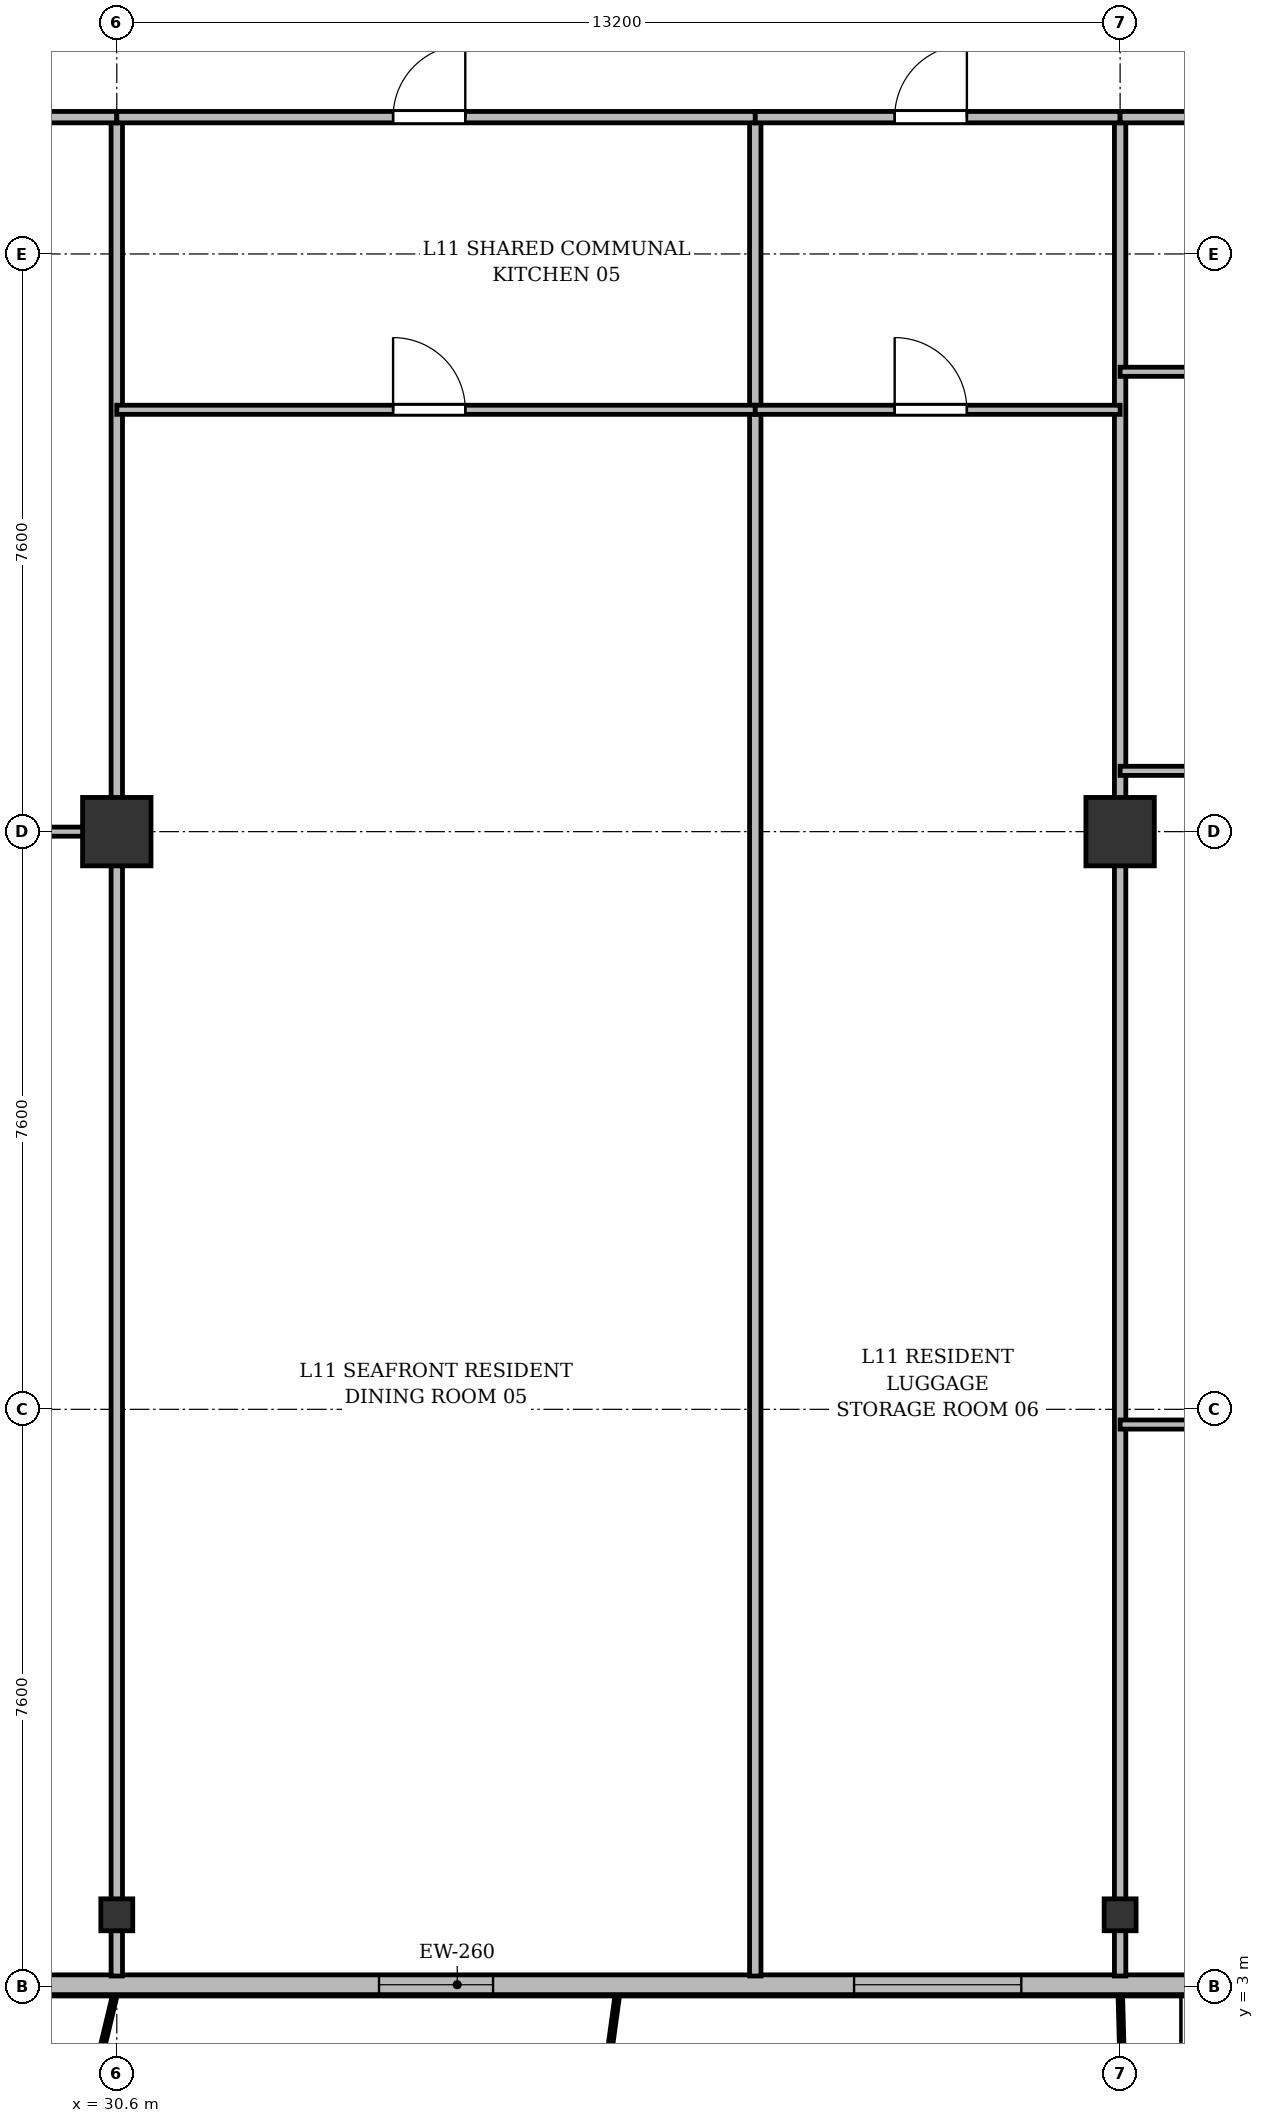
"""IFC4 building model, lengths in metres.
Left out: names, types, materials, properties, quantities, classifications, styles, units other than length and angle.
Written with IfcOpenShell. Run it as: python <this file> out.ifc"""

import sys

from ifc_helpers import new_model, si_unit, direction, frame, frame_2d, origin, origin_2d, place, context, subcontext, project, spatial, rectangle, i_section, extrude, source, transform, mapped, element, fill, save


model = new_model("IFC4")
c1 = context("Model", 3, precision=1e-05, world=origin(), true_north=direction((0.0, 1.0)))
c2 = subcontext(c1, "Body", "Model", "MODEL_VIEW")
j1 = project(units=[si_unit("LENGTHUNIT", "METRE"), si_unit("PLANEANGLEUNIT", "RADIAN")], contexts=[c1])
p1 = place(None, origin())
s1 = spatial("IfcSite", under=j1, at=p1, CompositionType="ELEMENT")
p2 = place(p1, origin())
s2 = spatial("IfcBuilding", under=s1, at=p2, CompositionType="ELEMENT")
p3 = place(p2, frame((0.0, 0.0, 45.1)))
s3 = spatial("IfcBuildingStorey", under=s2, at=p3, CompositionType="ELEMENT", Elevation=45.1)
m1 = source(origin(), c2, "Body", "SweptSolid", [
    extrude(i_section(OverallWidth=0.42, OverallDepth=0.42, WebThickness=0.026, FlangeThickness=0.04, at=origin_2d()), origin(), (0.0, 0.0, 1.0), 3.6),
])
p4 = place(p3, frame((30.6, 3.95, 0.0), z_axis=(0.0, 0.0, 1.0), x_axis=(1.0, 0.0, 0.0)))
e1 = element("IfcColumn", 1, at=p4, inside=s3, PredefinedType="COLUMN", context=c2, shape_type="MappedRepresentation", body=[
    mapped(m1, transform((0.0, 0.0, 0.0), x_axis=(1.0, 0.0, 0.0), y_axis=(0.0, 1.0, 0.0), z_axis=(0.0, 0.0, 1.0), scale=1.0)),
])
m2 = source(origin(), c2, "Body", "SweptSolid", [
    extrude(rectangle(XDim=0.9, YDim=0.9, at=origin_2d()), origin(), (0.0, 0.0, 1.0), 3.6),
])
p5 = place(p3, frame((30.6, 18.2, 0.0), z_axis=(0.0, 0.0, 1.0), x_axis=(1.0, 0.0, 0.0)))
e2 = element("IfcColumn", 2, at=p5, inside=s3, PredefinedType="COLUMN", context=c2, shape_type="MappedRepresentation", body=[
    mapped(m2, transform((0.0, 0.0, 0.0), x_axis=(1.0, 0.0, 0.0), y_axis=(0.0, 1.0, 0.0), z_axis=(0.0, 0.0, 1.0), scale=1.0)),
])
p6 = place(p3, frame((43.8, 3.95, 0.0), z_axis=(0.0, 0.0, 1.0), x_axis=(1.0, 0.0, 0.0)))
e3 = element("IfcColumn", 3, at=p6, inside=s3, PredefinedType="COLUMN", context=c2, shape_type="MappedRepresentation", body=[
    mapped(m1, transform((0.0, 0.0, 0.0), x_axis=(1.0, 0.0, 0.0), y_axis=(0.0, 1.0, 0.0), z_axis=(0.0, 0.0, 1.0), scale=1.0)),
])
p7 = place(p3, frame((43.8, 18.2, 0.0), z_axis=(0.0, 0.0, 1.0), x_axis=(1.0, 0.0, 0.0)))
e4 = element("IfcColumn", 4, at=p7, inside=s3, PredefinedType="COLUMN", context=c2, shape_type="MappedRepresentation", body=[
    mapped(m2, transform((0.0, 0.0, 0.0), x_axis=(1.0, 0.0, 0.0), y_axis=(0.0, 1.0, 0.0), z_axis=(0.0, 0.0, 1.0), scale=1.0)),
])
p8 = place(p3, frame((66.9, 3.03, 0.0), z_axis=(0.0, 0.0, 1.0), x_axis=(-1.0, 0.0, 0.0)))
e5 = element("IfcWall", 5, at=p8, inside=s3, PredefinedType="SOLIDWALL", context=c2, shape_type="SweptSolid", body=[
    extrude(rectangle(XDim=59.4, YDim=0.26, at=frame_2d((29.7, 0.0))), origin(), (0.0, 0.0, 1.0), 3.34),
])
p9 = place(p8, frame((0.395, 0.0, 0.9)))
e6 = element("IfcOpeningElement", 6, at=p9, cuts=e5, PredefinedType="OPENING", context=c2, shape_type="SweptSolid", body=[
    extrude(rectangle(XDim=2.2, YDim=1.8, at=frame_2d((1.1, 0.9))), frame((0.0, 0.14, 0.0), z_axis=(0.0, -1.0, 0.0), x_axis=(1.0, 0.0, 0.0)), (0.0, 0.0, 1.0), 0.28),
])
p10 = place(p8, frame((4.75, 0.0, 0.9)))
e7 = element("IfcOpeningElement", 7, at=p10, cuts=e5, PredefinedType="OPENING", context=c2, shape_type="SweptSolid", body=[
    extrude(rectangle(XDim=1.5, YDim=1.75, at=frame_2d((0.75, 0.875))), frame((0.0, 0.14, 0.0), z_axis=(0.0, -1.0, 0.0), x_axis=(1.0, 0.0, 0.0)), (0.0, 0.0, 1.0), 0.28),
])
p11 = place(p8, frame((11.0, 0.0, 0.9)))
e8 = element("IfcOpeningElement", 8, at=p11, cuts=e5, PredefinedType="OPENING", context=c2, shape_type="SweptSolid", body=[
    extrude(rectangle(XDim=2.0, YDim=1.95, at=frame_2d((1.0, 0.975))), frame((0.0, 0.14, 0.0), z_axis=(0.0, -1.0, 0.0), x_axis=(1.0, 0.0, 0.0)), (0.0, 0.0, 1.0), 0.28),
])
p12 = place(p8, frame((17.007, 0.0, 0.0)))
e9 = element("IfcOpeningElement", 9, at=p12, cuts=e5, PredefinedType="OPENING", context=c2, shape_type="SweptSolid", body=[
    extrude(rectangle(XDim=1.2, YDim=2.2, at=frame_2d((0.6, 1.1))), frame((0.0, 0.14, 0.0), z_axis=(0.0, -1.0, 0.0), x_axis=(1.0, 0.0, 0.0)), (0.0, 0.0, 1.0), 0.28),
])
p13 = place(p8, frame((20.4, 0.0, 0.9)))
e10 = element("IfcOpeningElement", 10, at=p13, cuts=e5, PredefinedType="OPENING", context=c2, shape_type="SweptSolid", body=[
    extrude(rectangle(XDim=1.8, YDim=1.8, at=frame_2d((0.9, 0.9))), frame((0.0, 0.14, 0.0), z_axis=(0.0, -1.0, 0.0), x_axis=(1.0, 0.0, 0.0)), (0.0, 0.0, 1.0), 0.28),
])
p14 = place(p8, frame((24.4, 0.0, 0.9)))
e11 = element("IfcOpeningElement", 11, at=p14, cuts=e5, PredefinedType="OPENING", context=c2, shape_type="SweptSolid", body=[
    extrude(rectangle(XDim=2.2, YDim=1.8, at=frame_2d((1.1, 0.9))), frame((0.0, 0.14, 0.0), z_axis=(0.0, -1.0, 0.0), x_axis=(1.0, 0.0, 0.0)), (0.0, 0.0, 1.0), 0.28),
])
p15 = place(p8, frame((31.35, 0.0, 0.9)))
e12 = element("IfcOpeningElement", 12, at=p15, cuts=e5, PredefinedType="OPENING", context=c2, shape_type="SweptSolid", body=[
    extrude(rectangle(XDim=1.5, YDim=1.75, at=frame_2d((0.75, 0.875))), frame((0.0, 0.14, 0.0), z_axis=(0.0, -1.0, 0.0), x_axis=(1.0, 0.0, 0.0)), (0.0, 0.0, 1.0), 0.28),
])
p16 = place(p8, frame((38.9, 0.0, 0.9)))
e13 = element("IfcOpeningElement", 13, at=p16, cuts=e5, PredefinedType="OPENING", context=c2, shape_type="SweptSolid", body=[
    extrude(rectangle(XDim=2.0, YDim=1.95, at=frame_2d((1.0, 0.975))), frame((0.0, 0.14, 0.0), z_axis=(0.0, -1.0, 0.0), x_axis=(1.0, 0.0, 0.0)), (0.0, 0.0, 1.0), 0.28),
])
p17 = place(p8, frame((45.435, 0.0, 0.0)))
e14 = element("IfcOpeningElement", 14, at=p17, cuts=e5, PredefinedType="OPENING", context=c2, shape_type="SweptSolid", body=[
    extrude(rectangle(XDim=1.2, YDim=2.2, at=frame_2d((0.6, 1.1))), frame((0.0, 0.14, 0.0), z_axis=(0.0, -1.0, 0.0), x_axis=(1.0, 0.0, 0.0)), (0.0, 0.0, 1.0), 0.28),
])
p18 = place(p8, frame((48.45, 0.0, 0.9)))
e15 = element("IfcOpeningElement", 15, at=p18, cuts=e5, PredefinedType="OPENING", context=c2, shape_type="SweptSolid", body=[
    extrude(rectangle(XDim=1.8, YDim=1.8, at=frame_2d((0.9, 0.9))), frame((0.0, 0.14, 0.0), z_axis=(0.0, -1.0, 0.0), x_axis=(1.0, 0.0, 0.0)), (0.0, 0.0, 1.0), 0.28),
])
p19 = place(p8, frame((52.0, 0.0, 0.9)))
e16 = element("IfcOpeningElement", 16, at=p19, cuts=e5, PredefinedType="OPENING", context=c2, shape_type="SweptSolid", body=[
    extrude(rectangle(XDim=2.2, YDim=1.8, at=frame_2d((1.1, 0.9))), frame((0.0, 0.14, 0.0), z_axis=(0.0, -1.0, 0.0), x_axis=(1.0, 0.0, 0.0)), (0.0, 0.0, 1.0), 0.28),
])
p20 = place(p8, frame((56.355, 0.0, 0.9)))
e17 = element("IfcOpeningElement", 17, at=p20, cuts=e5, PredefinedType="OPENING", context=c2, shape_type="SweptSolid", body=[
    extrude(rectangle(XDim=1.5, YDim=1.75, at=frame_2d((0.75, 0.875))), frame((0.0, 0.14, 0.0), z_axis=(0.0, -1.0, 0.0), x_axis=(1.0, 0.0, 0.0)), (0.0, 0.0, 1.0), 0.28),
])
p21 = place(p3, frame((30.6, 3.145, 0.0), z_axis=(0.0, 0.0, 1.0), x_axis=(0.0, 1.0, 0.0)))
e18 = element("IfcWall", 18, at=p21, inside=s3, PredefinedType="PARTITIONING", context=c2, shape_type="SweptSolid", body=[
    extrude(rectangle(XDim=24.455, YDim=0.15, at=frame_2d((12.228, 0.0))), origin(), (0.0, 0.0, 1.0), 2.752),
])
p22 = place(p3, frame((39.0, 3.145, 0.0), z_axis=(0.0, 0.0, 1.0), x_axis=(0.0, 1.0, 0.0)))
e19 = element("IfcWall", 19, at=p22, inside=s3, PredefinedType="PARTITIONING", context=c2, shape_type="SweptSolid", body=[
    extrude(rectangle(XDim=24.455, YDim=0.15, at=frame_2d((12.228, 0.0))), origin(), (0.0, 0.0, 1.0), 2.69),
])
p23 = place(p3, frame((43.8, 3.145, 0.0), z_axis=(0.0, 0.0, 1.0), x_axis=(0.0, 1.0, 0.0)))
e20 = element("IfcWall", 20, at=p23, inside=s3, PredefinedType="PARTITIONING", context=c2, shape_type="SweptSolid", body=[
    extrude(rectangle(XDim=24.455, YDim=0.15, at=frame_2d((12.228, 0.0))), origin(), (0.0, 0.0, 1.0), 2.752),
])
p24 = place(p3, frame((23.4, 27.6, 0.0), z_axis=(0.0, 0.0, 1.0), x_axis=(1.0, 0.0, 0.0)))
e21 = element("IfcWall", 21, at=p24, inside=s3, PredefinedType="PARTITIONING", context=c2, shape_type="SweptSolid", body=[
    extrude(rectangle(XDim=7.2, YDim=0.15, at=frame_2d((3.6, 0.0))), origin(), (0.0, 0.0, 1.0), 2.752),
])
p25 = place(p24, frame((3.125, 0.0, 0.0)))
e22 = element("IfcOpeningElement", 22, at=p25, cuts=e21, PredefinedType="OPENING", context=c2, shape_type="SweptSolid", body=[
    extrude(rectangle(XDim=0.95, YDim=2.15, at=frame_2d((0.475, 1.075))), frame((0.0, 0.085, 0.0), z_axis=(0.0, -1.0, 0.0), x_axis=(1.0, 0.0, 0.0)), (0.0, 0.0, 1.0), 0.17),
])
p26 = place(p3, frame((23.4, 18.2, 0.0), z_axis=(0.0, 0.0, 1.0), x_axis=(1.0, 0.0, 0.0)))
e23 = element("IfcWall", 23, at=p26, inside=s3, PredefinedType="PARTITIONING", context=c2, shape_type="SweptSolid", body=[
    extrude(rectangle(XDim=7.2, YDim=0.12, at=frame_2d((3.6, 0.0))), origin(), (0.0, 0.0, 1.0), 2.69),
])
p27 = place(p26, frame((3.125, 0.0, 0.0)))
e24 = element("IfcOpeningElement", 24, at=p27, cuts=e23, PredefinedType="OPENING", context=c2, shape_type="SweptSolid", body=[
    extrude(rectangle(XDim=0.95, YDim=2.15, at=frame_2d((0.475, 1.075))), frame((0.0, 0.07, 0.0), z_axis=(0.0, -1.0, 0.0), x_axis=(1.0, 0.0, 0.0)), (0.0, 0.0, 1.0), 0.14),
])
p28 = place(p3, frame((30.6, 27.6, 0.0), z_axis=(0.0, 0.0, 1.0), x_axis=(1.0, 0.0, 0.0)))
e25 = element("IfcWall", 25, at=p28, inside=s3, PredefinedType="PARTITIONING", context=c2, shape_type="SweptSolid", body=[
    extrude(rectangle(XDim=8.4, YDim=0.15, at=frame_2d((4.2, 0.0))), origin(), (0.0, 0.0, 1.0), 2.752),
])
p29 = place(p28, frame((3.635, 0.0, 0.0)))
e26 = element("IfcOpeningElement", 26, at=p29, cuts=e25, PredefinedType="OPENING", context=c2, shape_type="SweptSolid", body=[
    extrude(rectangle(XDim=0.95, YDim=2.15, at=frame_2d((0.475, 1.075))), frame((0.0, 0.085, 0.0), z_axis=(0.0, -1.0, 0.0), x_axis=(1.0, 0.0, 0.0)), (0.0, 0.0, 1.0), 0.17),
])
p30 = place(p3, frame((30.6, 23.75, 0.0), z_axis=(0.0, 0.0, 1.0), x_axis=(1.0, 0.0, 0.0)))
e27 = element("IfcWall", 27, at=p30, inside=s3, PredefinedType="PARTITIONING", context=c2, shape_type="SweptSolid", body=[
    extrude(rectangle(XDim=8.4, YDim=0.12, at=frame_2d((4.2, 0.0))), origin(), (0.0, 0.0, 1.0), 2.752),
])
p31 = place(p30, frame((3.635, 0.0, 0.0)))
e28 = element("IfcOpeningElement", 28, at=p31, cuts=e27, PredefinedType="OPENING", context=c2, shape_type="SweptSolid", body=[
    extrude(rectangle(XDim=0.95, YDim=2.15, at=frame_2d((0.475, 1.075))), frame((0.0, 0.07, 0.0), z_axis=(0.0, -1.0, 0.0), x_axis=(1.0, 0.0, 0.0)), (0.0, 0.0, 1.0), 0.14),
])
p32 = place(p3, frame((39.0, 27.6, 0.0), z_axis=(0.0, 0.0, 1.0), x_axis=(1.0, 0.0, 0.0)))
e29 = element("IfcWall", 29, at=p32, inside=s3, PredefinedType="PARTITIONING", context=c2, shape_type="SweptSolid", body=[
    extrude(rectangle(XDim=4.8, YDim=0.15, at=frame_2d((2.4, 0.0))), origin(), (0.0, 0.0, 1.0), 2.752),
])
p33 = place(p32, frame((1.834, 0.0, 0.0)))
e30 = element("IfcOpeningElement", 30, at=p33, cuts=e29, PredefinedType="OPENING", context=c2, shape_type="SweptSolid", body=[
    extrude(rectangle(XDim=0.95, YDim=2.15, at=frame_2d((0.475, 1.075))), frame((0.0, 0.085, 0.0), z_axis=(0.0, -1.0, 0.0), x_axis=(1.0, 0.0, 0.0)), (0.0, 0.0, 1.0), 0.17),
])
p34 = place(p3, frame((39.0, 23.75, 0.0), z_axis=(0.0, 0.0, 1.0), x_axis=(1.0, 0.0, 0.0)))
e31 = element("IfcWall", 31, at=p34, inside=s3, PredefinedType="PARTITIONING", context=c2, shape_type="SweptSolid", body=[
    extrude(rectangle(XDim=4.8, YDim=0.12, at=frame_2d((2.4, 0.0))), origin(), (0.0, 0.0, 1.0), 2.752),
])
p35 = place(p34, frame((1.834, 0.0, 0.0)))
e32 = element("IfcOpeningElement", 32, at=p35, cuts=e31, PredefinedType="OPENING", context=c2, shape_type="SweptSolid", body=[
    extrude(rectangle(XDim=0.95, YDim=2.15, at=frame_2d((0.475, 1.075))), frame((0.0, 0.07, 0.0), z_axis=(0.0, -1.0, 0.0), x_axis=(1.0, 0.0, 0.0)), (0.0, 0.0, 1.0), 0.14),
])
p36 = place(p3, frame((43.8, 19.0, 0.0), z_axis=(0.0, 0.0, 1.0), x_axis=(1.0, 0.0, 0.0)))
e33 = element("IfcWall", 33, at=p36, inside=s3, PredefinedType="PARTITIONING", context=c2, shape_type="SweptSolid", body=[
    extrude(rectangle(XDim=7.2, YDim=0.12, at=frame_2d((3.6, 0.0))), origin(), (0.0, 0.0, 1.0), 2.752),
])
p37 = place(p36, frame((3.125, 0.0, 0.0)))
e34 = element("IfcOpeningElement", 34, at=p37, cuts=e33, PredefinedType="OPENING", context=c2, shape_type="SweptSolid", body=[
    extrude(rectangle(XDim=0.95, YDim=2.15, at=frame_2d((0.475, 1.075))), frame((0.0, 0.07, 0.0), z_axis=(0.0, -1.0, 0.0), x_axis=(1.0, 0.0, 0.0)), (0.0, 0.0, 1.0), 0.14),
])
p38 = place(p3, frame((43.8, 24.25, 0.0), z_axis=(0.0, 0.0, 1.0), x_axis=(1.0, 0.0, 0.0)))
e35 = element("IfcWall", 35, at=p38, inside=s3, PredefinedType="PARTITIONING", context=c2, shape_type="SweptSolid", body=[
    extrude(rectangle(XDim=2.4, YDim=0.12, at=frame_2d((1.2, 0.0))), origin(), (0.0, 0.0, 1.0), 2.752),
])
p39 = place(p3, frame((43.8, 27.6, 0.0), z_axis=(0.0, 0.0, 1.0), x_axis=(1.0, 0.0, 0.0)))
e36 = element("IfcWall", 36, at=p39, inside=s3, PredefinedType="PARTITIONING", context=c2, shape_type="SweptSolid", body=[
    extrude(rectangle(XDim=7.2, YDim=0.15, at=frame_2d((3.6, 0.0))), origin(), (0.0, 0.0, 1.0), 2.752),
])
p40 = place(p39, frame((4.706, 0.0, 0.0)))
e37 = element("IfcOpeningElement", 37, at=p40, cuts=e36, PredefinedType="OPENING", context=c2, shape_type="SweptSolid", body=[
    extrude(rectangle(XDim=0.95, YDim=2.15, at=frame_2d((0.475, 1.075))), frame((0.0, 0.085, 0.0), z_axis=(0.0, -1.0, 0.0), x_axis=(1.0, 0.0, 0.0)), (0.0, 0.0, 1.0), 0.17),
])
p41 = place(p3, frame((43.8, 10.4, 0.0), z_axis=(0.0, 0.0, 1.0), x_axis=(1.0, 0.0, 0.0)))
e38 = element("IfcWall", 38, at=p41, inside=s3, PredefinedType="PARTITIONING", context=c2, shape_type="SweptSolid", body=[
    extrude(rectangle(XDim=3.6, YDim=0.12, at=frame_2d((1.8, 0.0))), origin(), (0.0, 0.0, 1.0), 2.752),
])
p42 = place(p41, frame((1.325, 0.0, 0.0)))
e39 = element("IfcOpeningElement", 39, at=p42, cuts=e38, PredefinedType="OPENING", context=c2, shape_type="SweptSolid", body=[
    extrude(rectangle(XDim=0.95, YDim=2.15, at=frame_2d((0.475, 1.075))), frame((0.0, 0.07, 0.0), z_axis=(0.0, -1.0, 0.0), x_axis=(1.0, 0.0, 0.0)), (0.0, 0.0, 1.0), 0.14),
])
m3 = source(origin(), c2, "Body", "SweptSolid", [
    extrude(rectangle(XDim=2.2, YDim=1.8, at=frame_2d((1.1, 0.9))), frame((0.0, 0.03, 0.0), z_axis=(0.0, -1.0, 0.0), x_axis=(1.0, 0.0, 0.0)), (0.0, 0.0, 1.0), 0.06),
])
p43 = place(p14, origin())
e40 = element("IfcWindow", 40, at=p43, inside=s3, PartitioningType="SINGLE_PANEL", PredefinedType="WINDOW", context=c2, shape_type="MappedRepresentation", body=[
    mapped(m3, transform((0.0, 0.0, 0.0), x_axis=(1.0, 0.0, 0.0), y_axis=(0.0, 1.0, 0.0), z_axis=(0.0, 0.0, 1.0), scale=1.0)),
])
fill(e11, e40)
m4 = source(origin(), c2, "Body", "SweptSolid", [
    extrude(rectangle(XDim=1.5, YDim=1.75, at=frame_2d((0.75, 0.875))), frame((0.0, 0.03, 0.0), z_axis=(0.0, -1.0, 0.0), x_axis=(1.0, 0.0, 0.0)), (0.0, 0.0, 1.0), 0.06),
])
p44 = place(p15, origin())
e41 = element("IfcWindow", 41, at=p44, inside=s3, PartitioningType="SINGLE_PANEL", PredefinedType="WINDOW", context=c2, shape_type="MappedRepresentation", body=[
    mapped(m4, transform((0.0, 0.0, 0.0), x_axis=(1.0, 0.0, 0.0), y_axis=(0.0, 1.0, 0.0), z_axis=(0.0, 0.0, 1.0), scale=1.0)),
])
fill(e12, e41)
m5 = source(origin(), c2, "Body", "SweptSolid", [
    extrude(rectangle(XDim=0.95, YDim=2.15, at=frame_2d((0.475, 1.075))), frame((0.0, 0.025, 0.0), z_axis=(0.0, -1.0, 0.0), x_axis=(1.0, 0.0, 0.0)), (0.0, 0.0, 1.0), 0.05),
])
p45 = place(p29, origin())
e42 = element("IfcDoor", 42, at=p45, inside=s3, OperationType="SINGLE_SWING_RIGHT", PredefinedType="DOOR", context=c2, shape_type="MappedRepresentation", body=[
    mapped(m5, transform((0.0, 0.0, 0.0), x_axis=(1.0, 0.0, 0.0), y_axis=(0.0, 1.0, 0.0), z_axis=(0.0, 0.0, 1.0), scale=1.0)),
])
fill(e26, e42)
p46 = place(p31, origin())
e43 = element("IfcDoor", 43, at=p46, inside=s3, OperationType="SINGLE_SWING_LEFT", PredefinedType="DOOR", context=c2, shape_type="MappedRepresentation", body=[
    mapped(m5, transform((0.0, 0.0, 0.0), x_axis=(1.0, 0.0, 0.0), y_axis=(0.0, 1.0, 0.0), z_axis=(0.0, 0.0, 1.0), scale=1.0)),
])
fill(e28, e43)
p47 = place(p33, origin())
e44 = element("IfcDoor", 44, at=p47, inside=s3, OperationType="SINGLE_SWING_RIGHT", PredefinedType="DOOR", context=c2, shape_type="MappedRepresentation", body=[
    mapped(m5, transform((0.0, 0.0, 0.0), x_axis=(1.0, 0.0, 0.0), y_axis=(0.0, 1.0, 0.0), z_axis=(0.0, 0.0, 1.0), scale=1.0)),
])
fill(e30, e44)
p48 = place(p35, origin())
e45 = element("IfcDoor", 45, at=p48, inside=s3, OperationType="SINGLE_SWING_LEFT", PredefinedType="DOOR", context=c2, shape_type="MappedRepresentation", body=[
    mapped(m5, transform((0.0, 0.0, 0.0), x_axis=(1.0, 0.0, 0.0), y_axis=(0.0, 1.0, 0.0), z_axis=(0.0, 0.0, 1.0), scale=1.0)),
])
fill(e32, e45)
save(model, sys.argv[1])
